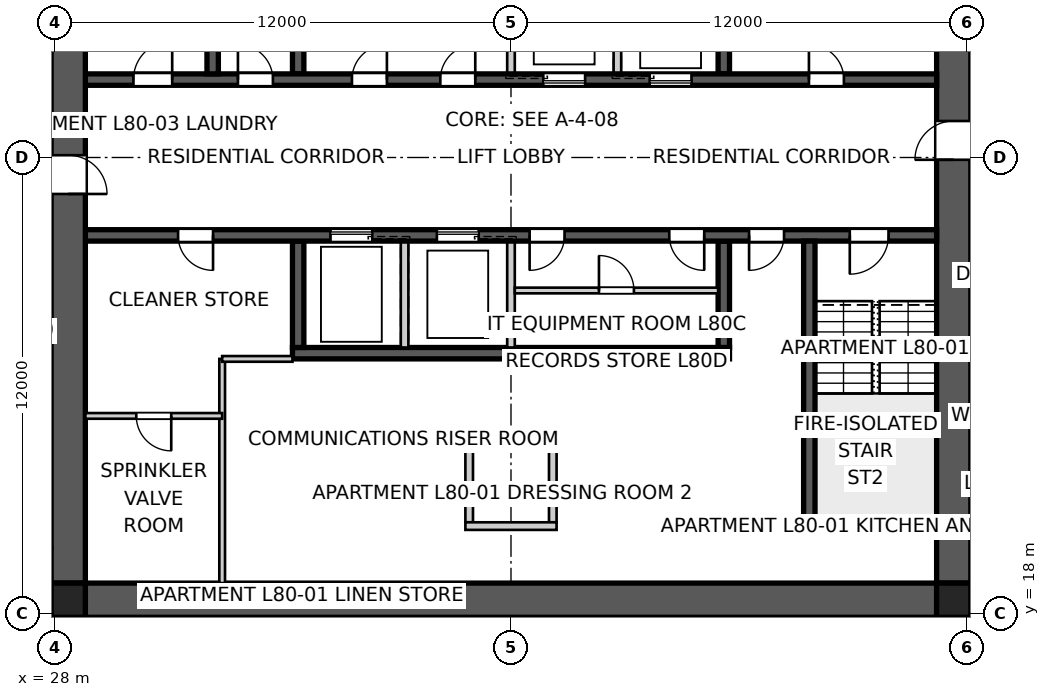
"""IFC4 building model, lengths in metres.
Left out: names, types, materials, properties, quantities, classifications, styles, units other than length and angle.
Written with IfcOpenShell. Run it as: python <this file> out.ifc"""

import sys

from ifc_helpers import new_model, si_unit, direction, frame, frame_2d, origin, origin_2d, place, context, subcontext, project, spatial, polyline, rectangle, outline, extrude, element, fill, save


model = new_model("IFC4")
c1 = context("Model", 3, precision=1e-05, world=origin(), true_north=direction((0.0, 1.0)))
c2 = subcontext(c1, "Body", "Model", "MODEL_VIEW")
j1 = project(units=[si_unit("LENGTHUNIT", "METRE"), si_unit("PLANEANGLEUNIT", "RADIAN")], contexts=[c1])
p1 = place(None, origin())
s1 = spatial("IfcSite", under=j1, at=p1, CompositionType="ELEMENT")
p2 = place(p1, origin())
s2 = spatial("IfcBuilding", under=s1, at=p2, CompositionType="ELEMENT")
p3 = place(p2, frame((0.0, 0.0, 289.6)))
s3 = spatial("IfcBuildingStorey", under=s2, at=p3, CompositionType="ELEMENT", Elevation=289.6)
p4 = place(p3, frame((51.2, 18.35, 0.0), z_axis=(0.0, 0.0, 1.0), x_axis=(-1.0, 0.0, 0.0)))
e1 = element("IfcWall", 1, at=p4, inside=s3, PredefinedType="SHEAR", context=c2, shape_type="SweptSolid", body=[
    extrude(outline(polyline([(0.0, -0.45), (22.4, -0.45), (22.4, -0.025), (22.85, -0.025), (22.85, 0.025), (22.4, 0.025), (22.4, 0.45), (0.0, 0.45), (0.0, 0.025), (-0.45, 0.025), (-0.45, -0.025), (0.0, -0.025), (0.0, -0.45)])), origin(), (0.0, 0.0, 1.0), 3.4),
])
p5 = place(p3, frame((51.65, 18.8, 0.0), z_axis=(0.0, 0.0, 1.0), x_axis=(0.0, 1.0, 0.0)))
e2 = element("IfcWall", 2, at=p5, inside=s3, PredefinedType="SHEAR", context=c2, shape_type="SweptSolid", body=[
    extrude(outline(polyline([(0.0, -0.45), (22.4, -0.45), (22.4, -0.025), (22.85, -0.025), (22.85, 0.025), (22.4, 0.025), (22.4, 0.45), (0.0, 0.45), (0.0, 0.025), (-0.45, 0.025), (-0.45, -0.025), (0.0, -0.025), (0.0, -0.45)])), origin(), (0.0, 0.0, 1.0), 3.4),
])
p6 = place(p5, frame((11.14, 0.0, 0.0)))
e3 = element("IfcOpeningElement", 3, at=p6, cuts=e2, PredefinedType="OPENING", context=c2, shape_type="SweptSolid", body=[
    extrude(rectangle(XDim=1.02, YDim=2.4, at=frame_2d((0.51, 1.2))), frame((0.0, 0.46, 0.0), z_axis=(0.0, -1.0, 0.0), x_axis=(1.0, 0.0, 0.0)), (0.0, 0.0, 1.0), 0.92),
])
p7 = place(p3, frame((28.35, 41.2, 0.0), z_axis=(0.0, 0.0, 1.0), x_axis=(0.0, -1.0, 0.0)))
e4 = element("IfcWall", 4, at=p7, inside=s3, PredefinedType="SHEAR", context=c2, shape_type="SweptSolid", body=[
    extrude(outline(polyline([(0.0, -0.45), (22.4, -0.45), (22.4, -0.025), (22.85, -0.025), (22.85, 0.025), (22.4, 0.025), (22.4, 0.45), (0.0, 0.45), (0.0, 0.025), (-0.45, 0.025), (-0.45, -0.025), (0.0, -0.025), (0.0, -0.45)])), origin(), (0.0, 0.0, 1.0), 3.4),
])
p8 = place(p7, frame((11.14, 0.0, 0.0)))
e5 = element("IfcOpeningElement", 5, at=p8, cuts=e4, PredefinedType="OPENING", context=c2, shape_type="SweptSolid", body=[
    extrude(rectangle(XDim=1.02, YDim=2.4, at=frame_2d((0.51, 1.2))), frame((0.0, 0.46, 0.0), z_axis=(0.0, -1.0, 0.0), x_axis=(1.0, 0.0, 0.0)), (0.0, 0.0, 1.0), 0.92),
])
p9 = place(p3, frame((28.8, 32.05, 0.0), z_axis=(0.0, 0.0, 1.0), x_axis=(1.0, 0.0, 0.0)))
e6 = element("IfcWall", 6, at=p9, inside=s3, PredefinedType="SHEAR", context=c2, shape_type="SweptSolid", body=[
    extrude(rectangle(XDim=22.4, YDim=0.3, at=frame_2d((11.2, 0.0))), origin(), (0.0, 0.0, 1.0), 3.4),
])
p10 = place(p9, frame((19.04, 0.0, 0.0)))
e7 = element("IfcOpeningElement", 7, at=p10, cuts=e6, PredefinedType="OPENING", context=c2, shape_type="SweptSolid", body=[
    extrude(rectangle(XDim=0.92, YDim=2.1, at=frame_2d((0.46, 1.05))), frame((0.0, 0.16, 0.0), z_axis=(0.0, -1.0, 0.0), x_axis=(1.0, 0.0, 0.0)), (0.0, 0.0, 1.0), 0.32),
])
p11 = place(p9, frame((1.265, 0.0, 0.0)))
e8 = element("IfcOpeningElement", 8, at=p11, cuts=e6, PredefinedType="OPENING", context=c2, shape_type="SweptSolid", body=[
    extrude(rectangle(XDim=1.02, YDim=2.1, at=frame_2d((0.51, 1.05))), frame((0.0, 0.16, 0.0), z_axis=(0.0, -1.0, 0.0), x_axis=(1.0, 0.0, 0.0)), (0.0, 0.0, 1.0), 0.32),
])
p12 = place(p9, frame((4.015, 0.0, 0.0)))
e9 = element("IfcOpeningElement", 9, at=p12, cuts=e6, PredefinedType="OPENING", context=c2, shape_type="SweptSolid", body=[
    extrude(rectangle(XDim=0.92, YDim=2.1, at=frame_2d((0.46, 1.05))), frame((0.0, 0.16, 0.0), z_axis=(0.0, -1.0, 0.0), x_axis=(1.0, 0.0, 0.0)), (0.0, 0.0, 1.0), 0.32),
])
p13 = place(p9, frame((7.015, 0.0, 0.0)))
e10 = element("IfcOpeningElement", 10, at=p13, cuts=e6, PredefinedType="OPENING", context=c2, shape_type="SweptSolid", body=[
    extrude(rectangle(XDim=0.92, YDim=2.1, at=frame_2d((0.46, 1.05))), frame((0.0, 0.16, 0.0), z_axis=(0.0, -1.0, 0.0), x_axis=(1.0, 0.0, 0.0)), (0.0, 0.0, 1.0), 0.32),
])
p14 = place(p9, frame((9.34, 0.0, 0.0)))
e11 = element("IfcOpeningElement", 11, at=p14, cuts=e6, PredefinedType="OPENING", context=c2, shape_type="SweptSolid", body=[
    extrude(rectangle(XDim=0.92, YDim=2.1, at=frame_2d((0.46, 1.05))), frame((0.0, 0.16, 0.0), z_axis=(0.0, -1.0, 0.0), x_axis=(1.0, 0.0, 0.0)), (0.0, 0.0, 1.0), 0.32),
])
p15 = place(p9, frame((12.05, 0.0, 0.0)))
e12 = element("IfcOpeningElement", 12, at=p15, cuts=e6, PredefinedType="OPENING", context=c2, shape_type="SweptSolid", body=[
    extrude(rectangle(XDim=1.1, YDim=2.1, at=frame_2d((0.55, 1.05))), frame((0.0, 0.16, 0.0), z_axis=(0.0, -1.0, 0.0), x_axis=(1.0, 0.0, 0.0)), (0.0, 0.0, 1.0), 0.32),
])
p16 = place(p9, frame((14.85, 0.0, 0.0)))
e13 = element("IfcOpeningElement", 13, at=p16, cuts=e6, PredefinedType="OPENING", context=c2, shape_type="SweptSolid", body=[
    extrude(rectangle(XDim=1.1, YDim=2.1, at=frame_2d((0.55, 1.05))), frame((0.0, 0.16, 0.0), z_axis=(0.0, -1.0, 0.0), x_axis=(1.0, 0.0, 0.0)), (0.0, 0.0, 1.0), 0.32),
])
p17 = place(p3, frame((51.2, 27.95, 0.0), z_axis=(0.0, 0.0, 1.0), x_axis=(-1.0, 0.0, 0.0)))
e14 = element("IfcWall", 14, at=p17, inside=s3, PredefinedType="SHEAR", context=c2, shape_type="SweptSolid", body=[
    extrude(rectangle(XDim=22.4, YDim=0.3, at=frame_2d((11.2, 0.0))), origin(), (0.0, 0.0, 1.0), 3.4),
])
p18 = place(p17, frame((19.04, 0.0, 0.0)))
e15 = element("IfcOpeningElement", 15, at=p18, cuts=e14, PredefinedType="OPENING", context=c2, shape_type="SweptSolid", body=[
    extrude(rectangle(XDim=0.92, YDim=2.1, at=frame_2d((0.46, 1.05))), frame((0.0, 0.16, 0.0), z_axis=(0.0, -1.0, 0.0), x_axis=(1.0, 0.0, 0.0)), (0.0, 0.0, 1.0), 0.32),
])
p19 = place(p17, frame((1.265, 0.0, 0.0)))
e16 = element("IfcOpeningElement", 16, at=p19, cuts=e14, PredefinedType="OPENING", context=c2, shape_type="SweptSolid", body=[
    extrude(rectangle(XDim=1.02, YDim=2.1, at=frame_2d((0.51, 1.05))), frame((0.0, 0.16, 0.0), z_axis=(0.0, -1.0, 0.0), x_axis=(1.0, 0.0, 0.0)), (0.0, 0.0, 1.0), 0.32),
])
p20 = place(p17, frame((4.015, 0.0, 0.0)))
e17 = element("IfcOpeningElement", 17, at=p20, cuts=e14, PredefinedType="OPENING", context=c2, shape_type="SweptSolid", body=[
    extrude(rectangle(XDim=0.92, YDim=2.1, at=frame_2d((0.46, 1.05))), frame((0.0, 0.16, 0.0), z_axis=(0.0, -1.0, 0.0), x_axis=(1.0, 0.0, 0.0)), (0.0, 0.0, 1.0), 0.32),
])
p21 = place(p17, frame((9.79, 0.0, 0.0)))
e18 = element("IfcOpeningElement", 18, at=p21, cuts=e14, PredefinedType="OPENING", context=c2, shape_type="SweptSolid", body=[
    extrude(rectangle(XDim=0.92, YDim=2.1, at=frame_2d((0.46, 1.05))), frame((0.0, 0.16, 0.0), z_axis=(0.0, -1.0, 0.0), x_axis=(1.0, 0.0, 0.0)), (0.0, 0.0, 1.0), 0.32),
])
p22 = place(p17, frame((6.115, 0.0, 0.0)))
e19 = element("IfcOpeningElement", 19, at=p22, cuts=e14, PredefinedType="OPENING", context=c2, shape_type="SweptSolid", body=[
    extrude(rectangle(XDim=0.92, YDim=2.1, at=frame_2d((0.46, 1.05))), frame((0.0, 0.16, 0.0), z_axis=(0.0, -1.0, 0.0), x_axis=(1.0, 0.0, 0.0)), (0.0, 0.0, 1.0), 0.32),
])
p23 = place(p17, frame((12.05, 0.0, 0.0)))
e20 = element("IfcOpeningElement", 20, at=p23, cuts=e14, PredefinedType="OPENING", context=c2, shape_type="SweptSolid", body=[
    extrude(rectangle(XDim=1.1, YDim=2.1, at=frame_2d((0.55, 1.05))), frame((0.0, 0.16, 0.0), z_axis=(0.0, -1.0, 0.0), x_axis=(1.0, 0.0, 0.0)), (0.0, 0.0, 1.0), 0.32),
])
p24 = place(p17, frame((14.85, 0.0, 0.0)))
e21 = element("IfcOpeningElement", 21, at=p24, cuts=e14, PredefinedType="OPENING", context=c2, shape_type="SweptSolid", body=[
    extrude(rectangle(XDim=1.1, YDim=2.1, at=frame_2d((0.55, 1.05))), frame((0.0, 0.16, 0.0), z_axis=(0.0, -1.0, 0.0), x_axis=(1.0, 0.0, 0.0)), (0.0, 0.0, 1.0), 0.32),
])
p25 = place(p3, frame((45.75, 24.85, 0.0), z_axis=(0.0, 0.0, 1.0), x_axis=(-1.0, 0.0, 0.0)))
e22 = element("IfcWall", 22, at=p25, inside=s3, PredefinedType="SHEAR", context=c2, shape_type="SweptSolid", body=[
    extrude(rectangle(XDim=11.5, YDim=0.3, at=frame_2d((5.75, 0.0))), origin(), (0.0, 0.0, 1.0), 3.4),
])
for number, where, z_axis, x_axis in (
    (23, (34.4, 32.2, 0.0), (0.0, 0.0, 1.0), (0.0, 1.0, 0.0)),
    (24, (45.6, 27.8, 0.0), (0.0, 0.0, 1.0), (0.0, -1.0, 0.0)),
):
    element("IfcWall", number, at=place(p3, frame(where, z_axis=z_axis, x_axis=x_axis)), inside=s3, PredefinedType="SHEAR", context=c2, shape_type="SweptSolid", body=[
        extrude(rectangle(XDim=2.8, YDim=0.3, at=frame_2d((1.4, 0.0))), origin(), (0.0, 0.0, 1.0), 3.4),
    ])
for number, where, z_axis, x_axis in (
    (25, (40.0, 32.2, 0.0), (0.0, 0.0, 1.0), (0.0, 1.0, 0.0)),
    (26, (40.0, 27.8, 0.0), (0.0, 0.0, 1.0), (0.0, -1.0, 0.0)),
    (27, (42.8, 32.2, 0.0), (0.0, 0.0, 1.0), (0.0, 1.0, 0.0)),
    (28, (37.2, 27.8, 0.0), (0.0, 0.0, 1.0), (0.0, -1.0, 0.0)),
):
    element("IfcWall", number, at=place(p3, frame(where, z_axis=z_axis, x_axis=x_axis)), inside=s3, PredefinedType="SOLIDWALL", context=c2, shape_type="SweptSolid", body=[
        extrude(rectangle(XDim=2.8, YDim=0.2, at=frame_2d((1.4, 0.0))), origin(), (0.0, 0.0, 1.0), 3.4),
    ])
for number, where, z_axis, x_axis in (
    (29, (45.6, 32.2, 0.0), (0.0, 0.0, 1.0), (0.0, 1.0, 0.0)),
    (30, (34.4, 27.8, 0.0), (0.0, 0.0, 1.0), (0.0, -1.0, 0.0)),
):
    element("IfcWall", number, at=place(p3, frame(where, z_axis=z_axis, x_axis=x_axis)), inside=s3, PredefinedType="SHEAR", context=c2, shape_type="SweptSolid", body=[
        extrude(rectangle(XDim=2.8, YDim=0.3, at=frame_2d((1.4, 0.0))), origin(), (0.0, 0.0, 1.0), 3.4),
    ])
for number, where, z_axis, x_axis in (
    (31, (32.15, 32.2, 0.0), (0.0, 0.0, 1.0), (0.0, 1.0, 0.0)),
    (32, (47.85, 27.8, 0.0), (0.0, 0.0, 1.0), (0.0, -1.0, 0.0)),
):
    element("IfcWall", number, at=place(p3, frame(where, z_axis=z_axis, x_axis=x_axis)), inside=s3, PredefinedType="SHEAR", context=c2, shape_type="SweptSolid", body=[
        extrude(rectangle(XDim=7.7, YDim=0.3, at=frame_2d((3.85, 0.0))), origin(), (0.0, 0.0, 1.0), 3.4),
    ])
p26 = place(p3, frame((51.2, 20.25, 0.0), z_axis=(0.0, 0.0, 1.0), x_axis=(-1.0, 0.0, 0.0)))
e33 = element("IfcWall", 33, at=p26, inside=s3, PredefinedType="SHEAR", context=c2, shape_type="SweptSolid", body=[
    extrude(rectangle(XDim=3.5, YDim=0.3, at=frame_2d((1.75, 0.0))), origin(), (0.0, 0.0, 1.0), 3.4),
])
for number, where, z_axis, x_axis in (
    (34, (38.9, 22.4, 0.0), (0.0, 0.0, 1.0), (0.0, -1.0, 0.0)),
    (35, (41.1, 22.4, 0.0), (0.0, 0.0, 1.0), (0.0, -1.0, 0.0)),
):
    element("IfcWall", number, at=place(p3, frame(where, z_axis=z_axis, x_axis=x_axis)), inside=s3, PredefinedType="SOLIDWALL", context=c2, shape_type="SweptSolid", body=[
        extrude(rectangle(XDim=2.0, YDim=0.2, at=frame_2d((1.0, 0.0))), origin(), (0.0, 0.0, 1.0), 3.4),
    ])
for number, where, z_axis, x_axis in (
    (36, (38.8, 22.5, 0.0), (0.0, 0.0, 1.0), (1.0, 0.0, 0.0)),
    (37, (38.8, 20.3, 0.0), (0.0, 0.0, 1.0), (1.0, 0.0, 0.0)),
):
    element("IfcWall", number, at=place(p3, frame(where, z_axis=z_axis, x_axis=x_axis)), inside=s3, PredefinedType="SOLIDWALL", context=c2, shape_type="SweptSolid", body=[
        extrude(rectangle(XDim=2.4, YDim=0.2, at=frame_2d((1.2, 0.0))), origin(), (0.0, 0.0, 1.0), 3.4),
    ])
for number, where, z_axis, x_axis in (
    (38, (28.35, 18.35, 0.0), (0.0, 0.0, 1.0), (1.0, 0.0, 0.0)),
    (39, (51.65, 18.35, 0.0), (0.0, 0.0, 1.0), (1.0, 0.0, 0.0)),
):
    element("IfcColumn", number, at=place(p3, frame(where, z_axis=z_axis, x_axis=x_axis)), inside=s3, PredefinedType="COLUMN", context=c2, shape_type="SweptSolid", body=[
        extrude(rectangle(XDim=0.9, YDim=0.9, at=origin_2d()), origin(), (0.0, 0.0, 1.0), 3.4),
    ])
p27 = place(p3, frame((24.296, 16.823, 0.0), z_axis=(0.0, 0.0, 1.0), x_axis=(0.76603440109, 0.64279957712, 0.0)))
e40 = element("IfcWall", 40, at=p27, inside=s3, PredefinedType="PARTITIONING", context=c2, shape_type="SweptSolid", body=[
    extrude(rectangle(XDim=4.64, YDim=0.25, at=frame_2d((2.32, 0.0))), origin(), (0.0, 0.0, 1.0), 3.25),
])
p28 = place(p3, frame((32.4, 18.8, 0.0), z_axis=(0.0, 0.0, 1.0), x_axis=(0.0, 1.0, 0.0)))
e41 = element("IfcWall", 41, at=p28, inside=s3, PredefinedType="SOLIDWALL", context=c2, shape_type="SweptSolid", body=[
    extrude(rectangle(XDim=5.9, YDim=0.15, at=frame_2d((2.95, 0.0))), origin(), (0.0, 0.0, 1.0), 3.25),
])
p29 = place(p3, frame((32.4, 24.7, 0.0), z_axis=(0.0, 0.0, 1.0), x_axis=(1.0, 0.0, 0.0)))
e42 = element("IfcWall", 42, at=p29, inside=s3, PredefinedType="SOLIDWALL", context=c2, shape_type="SweptSolid", body=[
    extrude(rectangle(XDim=1.85, YDim=0.15, at=frame_2d((0.925, 0.0))), origin(), (0.0, 0.0, 1.0), 3.25),
])
p30 = place(p3, frame((32.4, 23.2, 0.0), z_axis=(0.0, 0.0, 1.0), x_axis=(-1.0, 0.0, 0.0)))
e43 = element("IfcWall", 43, at=p30, inside=s3, PredefinedType="SOLIDWALL", context=c2, shape_type="SweptSolid", body=[
    extrude(rectangle(XDim=3.6, YDim=0.15, at=frame_2d((1.8, 0.0))), origin(), (0.0, 0.0, 1.0), 3.25),
])
p31 = place(p30, frame((1.34, 0.0, 0.0)))
e44 = element("IfcOpeningElement", 44, at=p31, cuts=e43, PredefinedType="OPENING", context=c2, shape_type="SweptSolid", body=[
    extrude(rectangle(XDim=0.92, YDim=2.1, at=frame_2d((0.46, 1.05))), frame((0.0, 0.085, 0.0), z_axis=(0.0, -1.0, 0.0), x_axis=(1.0, 0.0, 0.0)), (0.0, 0.0, 1.0), 0.17),
])
p32 = place(p3, frame((51.625, 17.9, 0.0), z_axis=(0.0, 0.0, 1.0), x_axis=(0.027925096799, 0.999610018442, 0.0)))
e45 = element("IfcWall", 45, at=p32, inside=s3, PredefinedType="SOLIDWALL", context=c2, shape_type="SweptSolid", body=[
    extrude(rectangle(XDim=0.9, YDim=0.15, at=frame_2d((0.45, 0.0))), origin(), (0.0, 0.0, 1.0), 3.25),
])
p33 = place(p3, frame((40.1, 26.5, 0.0), z_axis=(0.0, 0.0, 1.0), x_axis=(1.0, 0.0, 0.0)))
e46 = element("IfcWall", 46, at=p33, inside=s3, PredefinedType="SOLIDWALL", context=c2, shape_type="SweptSolid", body=[
    extrude(rectangle(XDim=5.35, YDim=0.15, at=frame_2d((2.675, 0.0))), origin(), (0.0, 0.0, 1.0), 3.25),
])
p34 = place(p33, frame((2.215, 0.0, 0.0)))
e47 = element("IfcOpeningElement", 47, at=p34, cuts=e46, PredefinedType="OPENING", context=c2, shape_type="SweptSolid", body=[
    extrude(rectangle(XDim=0.92, YDim=2.1, at=frame_2d((0.46, 1.05))), frame((0.0, 0.085, 0.0), z_axis=(0.0, -1.0, 0.0), x_axis=(1.0, 0.0, 0.0)), (0.0, 0.0, 1.0), 0.17),
])
p35 = place(p10, origin())
e48 = element("IfcDoor", 48, at=p35, inside=s3, OperationType="SINGLE_SWING_LEFT", PredefinedType="DOOR", context=c2, shape_type="SweptSolid", body=[
    extrude(rectangle(XDim=0.92, YDim=2.1, at=frame_2d((0.46, 1.05))), frame((0.0, 0.025, 0.0), z_axis=(0.0, -1.0, 0.0), x_axis=(1.0, 0.0, 0.0)), (0.0, 0.0, 1.0), 0.05),
])
fill(e7, e48)
p36 = place(p18, origin())
e49 = element("IfcDoor", 49, at=p36, inside=s3, OperationType="SINGLE_SWING_LEFT", PredefinedType="DOOR", context=c2, shape_type="SweptSolid", body=[
    extrude(rectangle(XDim=0.92, YDim=2.1, at=frame_2d((0.46, 1.05))), frame((0.0, 0.025, 0.0), z_axis=(0.0, -1.0, 0.0), x_axis=(1.0, 0.0, 0.0)), (0.0, 0.0, 1.0), 0.05),
])
fill(e15, e49)
p37 = place(p19, origin())
e50 = element("IfcDoor", 50, at=p37, inside=s3, OperationType="SINGLE_SWING_RIGHT", PredefinedType="DOOR", context=c2, shape_type="SweptSolid", body=[
    extrude(rectangle(XDim=1.02, YDim=2.1, at=frame_2d((0.51, 1.05))), frame((0.0, 0.025, 0.0), z_axis=(0.0, -1.0, 0.0), x_axis=(1.0, 0.0, 0.0)), (0.0, 0.0, 1.0), 0.05),
])
fill(e16, e50)
p38 = place(p11, origin())
e51 = element("IfcDoor", 51, at=p38, inside=s3, OperationType="SINGLE_SWING_RIGHT", PredefinedType="DOOR", context=c2, shape_type="SweptSolid", body=[
    extrude(rectangle(XDim=1.02, YDim=2.1, at=frame_2d((0.51, 1.05))), frame((0.0, 0.025, 0.0), z_axis=(0.0, -1.0, 0.0), x_axis=(1.0, 0.0, 0.0)), (0.0, 0.0, 1.0), 0.05),
])
fill(e8, e51)
p39 = place(p12, origin())
e52 = element("IfcDoor", 52, at=p39, inside=s3, OperationType="SINGLE_SWING_LEFT", PredefinedType="DOOR", context=c2, shape_type="SweptSolid", body=[
    extrude(rectangle(XDim=0.92, YDim=2.1, at=frame_2d((0.46, 1.05))), frame((0.0, 0.025, 0.0), z_axis=(0.0, -1.0, 0.0), x_axis=(1.0, 0.0, 0.0)), (0.0, 0.0, 1.0), 0.05),
])
fill(e9, e52)
p40 = place(p20, origin())
e53 = element("IfcDoor", 53, at=p40, inside=s3, OperationType="SINGLE_SWING_RIGHT", PredefinedType="DOOR", context=c2, shape_type="SweptSolid", body=[
    extrude(rectangle(XDim=0.92, YDim=2.1, at=frame_2d((0.46, 1.05))), frame((0.0, 0.025, 0.0), z_axis=(0.0, -1.0, 0.0), x_axis=(1.0, 0.0, 0.0)), (0.0, 0.0, 1.0), 0.05),
])
fill(e17, e53)
p41 = place(p31, origin())
e54 = element("IfcDoor", 54, at=p41, inside=s3, OperationType="SINGLE_SWING_LEFT", PredefinedType="DOOR", context=c2, shape_type="SweptSolid", body=[
    extrude(rectangle(XDim=0.92, YDim=2.1, at=frame_2d((0.46, 1.05))), frame((0.0, 0.025, 0.0), z_axis=(0.0, -1.0, 0.0), x_axis=(1.0, 0.0, 0.0)), (0.0, 0.0, 1.0), 0.05),
])
fill(e44, e54)
p42 = place(p13, origin())
e55 = element("IfcDoor", 55, at=p42, inside=s3, OperationType="SINGLE_SWING_RIGHT", PredefinedType="DOOR", context=c2, shape_type="SweptSolid", body=[
    extrude(rectangle(XDim=0.92, YDim=2.1, at=frame_2d((0.46, 1.05))), frame((0.0, 0.025, 0.0), z_axis=(0.0, -1.0, 0.0), x_axis=(1.0, 0.0, 0.0)), (0.0, 0.0, 1.0), 0.05),
])
fill(e10, e55)
p43 = place(p14, origin())
e56 = element("IfcDoor", 56, at=p43, inside=s3, OperationType="SINGLE_SWING_RIGHT", PredefinedType="DOOR", context=c2, shape_type="SweptSolid", body=[
    extrude(rectangle(XDim=0.92, YDim=2.1, at=frame_2d((0.46, 1.05))), frame((0.0, 0.025, 0.0), z_axis=(0.0, -1.0, 0.0), x_axis=(1.0, 0.0, 0.0)), (0.0, 0.0, 1.0), 0.05),
])
fill(e11, e56)
p44 = place(p21, origin())
e57 = element("IfcDoor", 57, at=p44, inside=s3, OperationType="SINGLE_SWING_RIGHT", PredefinedType="DOOR", context=c2, shape_type="SweptSolid", body=[
    extrude(rectangle(XDim=0.92, YDim=2.1, at=frame_2d((0.46, 1.05))), frame((0.0, 0.025, 0.0), z_axis=(0.0, -1.0, 0.0), x_axis=(1.0, 0.0, 0.0)), (0.0, 0.0, 1.0), 0.05),
])
fill(e18, e57)
p45 = place(p22, origin())
e58 = element("IfcDoor", 58, at=p45, inside=s3, OperationType="SINGLE_SWING_LEFT", PredefinedType="DOOR", context=c2, shape_type="SweptSolid", body=[
    extrude(rectangle(XDim=0.92, YDim=2.1, at=frame_2d((0.46, 1.05))), frame((0.0, 0.025, 0.0), z_axis=(0.0, -1.0, 0.0), x_axis=(1.0, 0.0, 0.0)), (0.0, 0.0, 1.0), 0.05),
])
fill(e19, e58)
p46 = place(p34, origin())
e59 = element("IfcDoor", 59, at=p46, inside=s3, OperationType="SINGLE_SWING_LEFT", PredefinedType="DOOR", context=c2, shape_type="SweptSolid", body=[
    extrude(rectangle(XDim=0.92, YDim=2.1, at=frame_2d((0.46, 1.05))), frame((0.0, 0.025, 0.0), z_axis=(0.0, -1.0, 0.0), x_axis=(1.0, 0.0, 0.0)), (0.0, 0.0, 1.0), 0.05),
])
fill(e47, e59)
p47 = place(p6, origin())
e60 = element("IfcDoor", 60, at=p47, inside=s3, OperationType="SINGLE_SWING_LEFT", PredefinedType="DOOR", context=c2, shape_type="SweptSolid", body=[
    extrude(rectangle(XDim=1.02, YDim=2.4, at=frame_2d((0.51, 1.2))), frame((0.0, 0.025, 0.0), z_axis=(0.0, -1.0, 0.0), x_axis=(1.0, 0.0, 0.0)), (0.0, 0.0, 1.0), 0.05),
])
fill(e3, e60)
p48 = place(p8, origin())
e61 = element("IfcDoor", 61, at=p48, inside=s3, OperationType="SINGLE_SWING_RIGHT", PredefinedType="DOOR", context=c2, shape_type="SweptSolid", body=[
    extrude(rectangle(XDim=1.02, YDim=2.4, at=frame_2d((0.51, 1.2))), frame((0.0, 0.025, 0.0), z_axis=(0.0, -1.0, 0.0), x_axis=(1.0, 0.0, 0.0)), (0.0, 0.0, 1.0), 0.05),
])
fill(e5, e61)
p49 = place(p15, origin())
e62 = element("IfcDoor", 62, at=p49, inside=s3, OperationType="SLIDING_TO_LEFT", PredefinedType="DOOR", context=c2, shape_type="SweptSolid", body=[
    extrude(rectangle(XDim=1.1, YDim=2.1, at=frame_2d((0.55, 1.05))), frame((0.0, 0.025, 0.0), z_axis=(0.0, -1.0, 0.0), x_axis=(1.0, 0.0, 0.0)), (0.0, 0.0, 1.0), 0.05),
])
fill(e12, e62)
p50 = place(p23, origin())
e63 = element("IfcDoor", 63, at=p50, inside=s3, OperationType="SLIDING_TO_LEFT", PredefinedType="DOOR", context=c2, shape_type="SweptSolid", body=[
    extrude(rectangle(XDim=1.1, YDim=2.1, at=frame_2d((0.55, 1.05))), frame((0.0, 0.025, 0.0), z_axis=(0.0, -1.0, 0.0), x_axis=(1.0, 0.0, 0.0)), (0.0, 0.0, 1.0), 0.05),
])
fill(e20, e63)
p51 = place(p16, origin())
e64 = element("IfcDoor", 64, at=p51, inside=s3, OperationType="SLIDING_TO_LEFT", PredefinedType="DOOR", context=c2, shape_type="SweptSolid", body=[
    extrude(rectangle(XDim=1.1, YDim=2.1, at=frame_2d((0.55, 1.05))), frame((0.0, 0.025, 0.0), z_axis=(0.0, -1.0, 0.0), x_axis=(1.0, 0.0, 0.0)), (0.0, 0.0, 1.0), 0.05),
])
fill(e13, e64)
p52 = place(p24, origin())
e65 = element("IfcDoor", 65, at=p52, inside=s3, OperationType="SLIDING_TO_LEFT", PredefinedType="DOOR", context=c2, shape_type="SweptSolid", body=[
    extrude(rectangle(XDim=1.1, YDim=2.1, at=frame_2d((0.55, 1.05))), frame((0.0, 0.025, 0.0), z_axis=(0.0, -1.0, 0.0), x_axis=(1.0, 0.0, 0.0)), (0.0, 0.0, 1.0), 0.05),
])
fill(e21, e65)
save(model, sys.argv[1])
